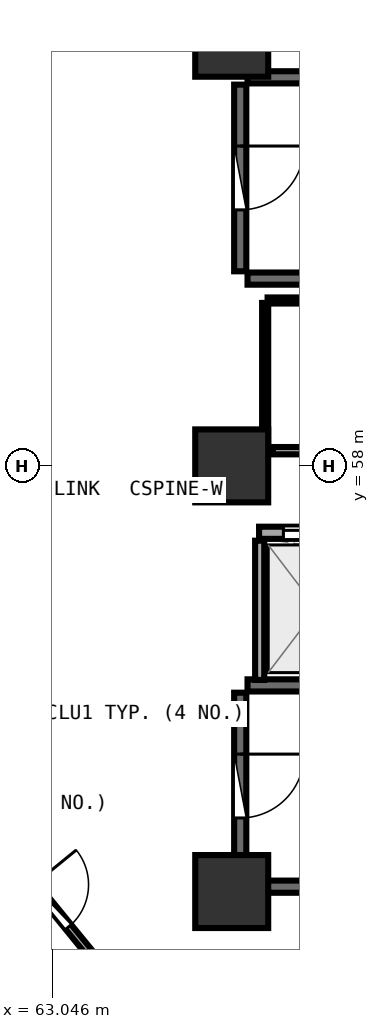
"""IFC4 building model, lengths in metres.
Left out: names, types, materials, properties, quantities, classifications, styles, units other than length and angle.
Written with IfcOpenShell. Run it as: python <this file> out.ifc"""

import sys

from ifc_helpers import new_model, si_unit, direction, frame, frame_2d, origin, origin_2d, place, context, subcontext, project, spatial, rectangle, extrude, element, fill, save


model = new_model("IFC4")
c1 = context("Model", 3, precision=1e-05, world=origin(), true_north=direction((0.0, 1.0)))
c2 = subcontext(c1, "Body", "Model", "MODEL_VIEW")
j1 = project(units=[si_unit("LENGTHUNIT", "METRE"), si_unit("PLANEANGLEUNIT", "RADIAN")], contexts=[c1])
p1 = place(None, origin())
s1 = spatial("IfcSite", under=j1, at=p1, CompositionType="ELEMENT")
p2 = place(p1, origin())
s2 = spatial("IfcBuilding", under=s1, at=p2, CompositionType="ELEMENT")
p3 = place(p2, frame((0.0, 0.0, 150.6)))
s3 = spatial("IfcBuildingStorey", under=s2, at=p3, CompositionType="ELEMENT", Elevation=150.6)
for number, where, z_axis, x_axis in (
    (1, (66.0, 51.0, 0.0), (0.0, 0.0, 1.0), (1.0, 0.0, 0.0)),
    (2, (66.0, 65.0, 0.0), (0.0, 0.0, 1.0), (1.0, 0.0, 0.0)),
    (3, (66.0, 58.0, 0.0), (0.0, 0.0, 1.0), (1.0, 0.0, 0.0)),
):
    element("IfcColumn", number, at=place(p3, frame(where, z_axis=z_axis, x_axis=x_axis)), inside=s3, PredefinedType="PILASTER", context=c2, shape_type="SweptSolid", body=[
        extrude(rectangle(XDim=1.2, YDim=1.2, at=origin_2d()), origin(), (0.0, 0.0, 1.0), 3.75),
    ])
for number, where, z_axis, x_axis in (
    (4, (66.26, 61.08, 0.0), (0.0, 0.0, 1.0), (1.0, 0.0, 0.0)),
    (5, (73.42, 64.39, 0.0), (0.0, 0.0, 1.0), (-1.0, 0.0, 0.0)),
):
    element("IfcWall", number, at=place(p3, frame(where, z_axis=z_axis, x_axis=x_axis)), inside=s3, PredefinedType="SHEAR", context=c2, shape_type="SweptSolid", body=[
        extrude(rectangle(XDim=7.16, YDim=0.2, at=frame_2d((3.58, 0.0))), origin(), (0.0, 0.0, 1.0), 3.49),
    ])
p4 = place(p3, frame((66.14, 64.27, 0.0), z_axis=(0.0, 0.0, 1.0), x_axis=(0.0, -1.0, 0.0)))
e6 = element("IfcWall", 6, at=p4, inside=s3, PredefinedType="SHEAR", context=c2, shape_type="SweptSolid", body=[
    extrude(rectangle(XDim=3.07, YDim=0.2, at=frame_2d((1.535, 0.0))), origin(), (0.0, 0.0, 1.0), 3.49),
])
p5 = place(p4, frame((1.01, 0.0, 0.0)))
e7 = element("IfcOpeningElement", 7, at=p5, cuts=e6, PredefinedType="OPENING", context=c2, shape_type="SweptSolid", body=[
    extrude(rectangle(XDim=1.05, YDim=2.1, at=frame_2d((0.525, 1.05))), frame((0.0, 0.11, 0.0), z_axis=(0.0, -1.0, 0.0), x_axis=(1.0, 0.0, 0.0)), (0.0, 0.0, 1.0), 0.22),
])
for number, where, z_axis, x_axis in (
    (8, (66.26, 51.08, 0.0), (0.0, 0.0, 1.0), (1.0, 0.0, 0.0)),
    (9, (73.42, 54.39, 0.0), (0.0, 0.0, 1.0), (-1.0, 0.0, 0.0)),
):
    element("IfcWall", number, at=place(p3, frame(where, z_axis=z_axis, x_axis=x_axis)), inside=s3, PredefinedType="SHEAR", context=c2, shape_type="SweptSolid", body=[
        extrude(rectangle(XDim=7.16, YDim=0.2, at=frame_2d((3.58, 0.0))), origin(), (0.0, 0.0, 1.0), 3.49),
    ])
p6 = place(p3, frame((66.14, 54.27, 0.0), z_axis=(0.0, 0.0, 1.0), x_axis=(0.0, -1.0, 0.0)))
e10 = element("IfcWall", 10, at=p6, inside=s3, PredefinedType="SHEAR", context=c2, shape_type="SweptSolid", body=[
    extrude(rectangle(XDim=3.07, YDim=0.2, at=frame_2d((1.535, 0.0))), origin(), (0.0, 0.0, 1.0), 3.49),
])
p7 = place(p6, frame((1.01, 0.0, 0.0)))
e11 = element("IfcOpeningElement", 11, at=p7, cuts=e10, PredefinedType="OPENING", context=c2, shape_type="SweptSolid", body=[
    extrude(rectangle(XDim=1.05, YDim=2.1, at=frame_2d((0.525, 1.05))), frame((0.0, 0.11, 0.0), z_axis=(0.0, -1.0, 0.0), x_axis=(1.0, 0.0, 0.0)), (0.0, 0.0, 1.0), 0.22),
])
p8 = place(p3, frame((66.45, 56.9, 0.0), z_axis=(0.0, 0.0, 1.0), x_axis=(1.0, 0.0, 0.0)))
e12 = element("IfcWall", 12, at=p8, inside=s3, PredefinedType="SOLIDWALL", context=c2, shape_type="SweptSolid", body=[
    extrude(rectangle(XDim=14.4, YDim=0.2, at=frame_2d((7.2, 0.0))), origin(), (0.0, 0.0, 1.0), 3.48),
])
p9 = place(p8, frame((0.4, 0.0, 0.0)))
e13 = element("IfcOpeningElement", 13, at=p9, cuts=e12, PredefinedType="OPENING", context=c2, shape_type="SweptSolid", body=[
    extrude(rectangle(XDim=1.1, YDim=2.1, at=frame_2d((0.55, 1.05))), frame((0.0, 0.11, 0.0), z_axis=(0.0, -1.0, 0.0), x_axis=(1.0, 0.0, 0.0)), (0.0, 0.0, 1.0), 0.22),
])
p10 = place(p8, frame((2.4, 0.0, 0.0)))
e14 = element("IfcOpeningElement", 14, at=p10, cuts=e12, PredefinedType="OPENING", context=c2, shape_type="SweptSolid", body=[
    extrude(rectangle(XDim=1.1, YDim=2.1, at=frame_2d((0.55, 1.05))), frame((0.0, 0.11, 0.0), z_axis=(0.0, -1.0, 0.0), x_axis=(1.0, 0.0, 0.0)), (0.0, 0.0, 1.0), 0.22),
])
p11 = place(p8, frame((4.4, 0.0, 0.0)))
e15 = element("IfcOpeningElement", 15, at=p11, cuts=e12, PredefinedType="OPENING", context=c2, shape_type="SweptSolid", body=[
    extrude(rectangle(XDim=1.1, YDim=2.1, at=frame_2d((0.55, 1.05))), frame((0.0, 0.11, 0.0), z_axis=(0.0, -1.0, 0.0), x_axis=(1.0, 0.0, 0.0)), (0.0, 0.0, 1.0), 0.22),
])
p12 = place(p3, frame((66.46, 54.48, 0.0), z_axis=(0.0, 0.0, 1.0), x_axis=(0.0, 1.0, 0.0)))
e16 = element("IfcWall", 16, at=p12, inside=s3, PredefinedType="PARTITIONING", context=c2, shape_type="SweptSolid", body=[
    extrude(rectangle(XDim=2.29, YDim=0.15, at=frame_2d((1.145, 0.0))), origin(), (0.0, 0.0, 1.0), 3.48),
])
p13 = place(p3, frame((66.675, 58.25, 0.0), z_axis=(0.0, 0.0, 1.0), x_axis=(1.0, 0.0, 0.0)))
e17 = element("IfcWall", 17, at=p13, inside=s3, PredefinedType="PARTITIONING", context=c2, shape_type="SweptSolid", body=[
    extrude(rectangle(XDim=3.265, YDim=0.12, at=frame_2d((1.632, 0.0))), origin(), (0.0, 0.0, 1.0), 3.48),
])
p14 = place(p13, frame((1.182, 0.0, 0.0)))
e18 = element("IfcOpeningElement", 18, at=p14, cuts=e17, PredefinedType="OPENING", context=c2, shape_type="SweptSolid", body=[
    extrude(rectangle(XDim=0.9, YDim=2.08, at=frame_2d((0.45, 1.04))), frame((0.0, 0.07, 0.0), z_axis=(0.0, -1.0, 0.0), x_axis=(1.0, 0.0, 0.0)), (0.0, 0.0, 1.0), 0.14),
])
p15 = place(p3, frame((61.604, 52.511, 0.0), z_axis=(0.0, 0.0, 1.0), x_axis=(0.632491819148, -0.77456703952, 0.0)))
e19 = element("IfcWall", 19, at=p15, inside=s3, PredefinedType="PARTITIONING", context=c2, shape_type="SweptSolid", body=[
    extrude(rectangle(XDim=4.511, YDim=0.12, at=frame_2d((2.255, 0.0))), origin(), (0.0, 0.0, 1.0), 2.975),
])
p16 = place(p15, frame((1.805, 0.0, 0.0)))
e20 = element("IfcOpeningElement", 20, at=p16, cuts=e19, PredefinedType="OPENING", context=c2, shape_type="SweptSolid", body=[
    extrude(rectangle(XDim=0.9, YDim=2.08, at=frame_2d((0.45, 1.04))), frame((0.0, 0.07, 0.0), z_axis=(0.0, -1.0, 0.0), x_axis=(1.0, 0.0, 0.0)), (0.0, 0.0, 1.0), 0.14),
])
p17 = place(p3, frame((69.96, 60.72, 0.0), z_axis=(0.0, 0.0, 1.0), x_axis=(-1.0, 0.0, 0.0)))
e21 = element("IfcWall", 21, at=p17, inside=s3, PredefinedType="PARTITIONING", context=c2, shape_type="SweptSolid", body=[
    extrude(rectangle(XDim=3.37, YDim=0.1, at=frame_2d((1.685, 0.0))), origin(), (0.0, 0.0, 1.0), 3.48),
])
p18 = place(p3, frame((66.55, 60.68, 0.0), z_axis=(0.0, 0.0, 1.0), x_axis=(0.0, -1.0, 0.0)))
e22 = element("IfcWall", 22, at=p18, inside=s3, PredefinedType="PARTITIONING", context=c2, shape_type="SweptSolid", body=[
    extrude(rectangle(XDim=2.383, YDim=0.1, at=frame_2d((1.191, 0.0))), origin(), (0.0, 0.0, 1.0), 3.48),
])
p19 = place(p5, origin())
e23 = element("IfcDoor", 23, at=p19, inside=s3, OperationType="SINGLE_SWING_LEFT", PredefinedType="DOOR", context=c2, shape_type="SweptSolid", body=[
    extrude(rectangle(XDim=1.05, YDim=2.1, at=frame_2d((0.525, 1.05))), frame((0.0, 0.025, 0.0), z_axis=(0.0, -1.0, 0.0), x_axis=(1.0, 0.0, 0.0)), (0.0, 0.0, 1.0), 0.05),
])
fill(e7, e23)
p20 = place(p7, origin())
e24 = element("IfcDoor", 24, at=p20, inside=s3, OperationType="SINGLE_SWING_LEFT", PredefinedType="DOOR", context=c2, shape_type="SweptSolid", body=[
    extrude(rectangle(XDim=1.05, YDim=2.1, at=frame_2d((0.525, 1.05))), frame((0.0, 0.025, 0.0), z_axis=(0.0, -1.0, 0.0), x_axis=(1.0, 0.0, 0.0)), (0.0, 0.0, 1.0), 0.05),
])
fill(e11, e24)
p21 = place(p9, origin())
e25 = element("IfcDoor", 25, at=p21, inside=s3, OperationType="DOUBLE_DOOR_SLIDING", PredefinedType="DOOR", context=c2, shape_type="SweptSolid", body=[
    extrude(rectangle(XDim=1.1, YDim=2.1, at=frame_2d((0.55, 1.05))), frame((0.0, 0.025, 0.0), z_axis=(0.0, -1.0, 0.0), x_axis=(1.0, 0.0, 0.0)), (0.0, 0.0, 1.0), 0.05),
])
fill(e13, e25)
p22 = place(p16, origin())
e26 = element("IfcDoor", 26, at=p22, inside=s3, OperationType="SINGLE_SWING_LEFT", PredefinedType="DOOR", context=c2, shape_type="SweptSolid", body=[
    extrude(rectangle(XDim=0.9, YDim=2.08, at=frame_2d((0.45, 1.04))), frame((0.0, 0.025, 0.0), z_axis=(0.0, -1.0, 0.0), x_axis=(1.0, 0.0, 0.0)), (0.0, 0.0, 1.0), 0.05),
])
fill(e20, e26)
save(model, sys.argv[1])
